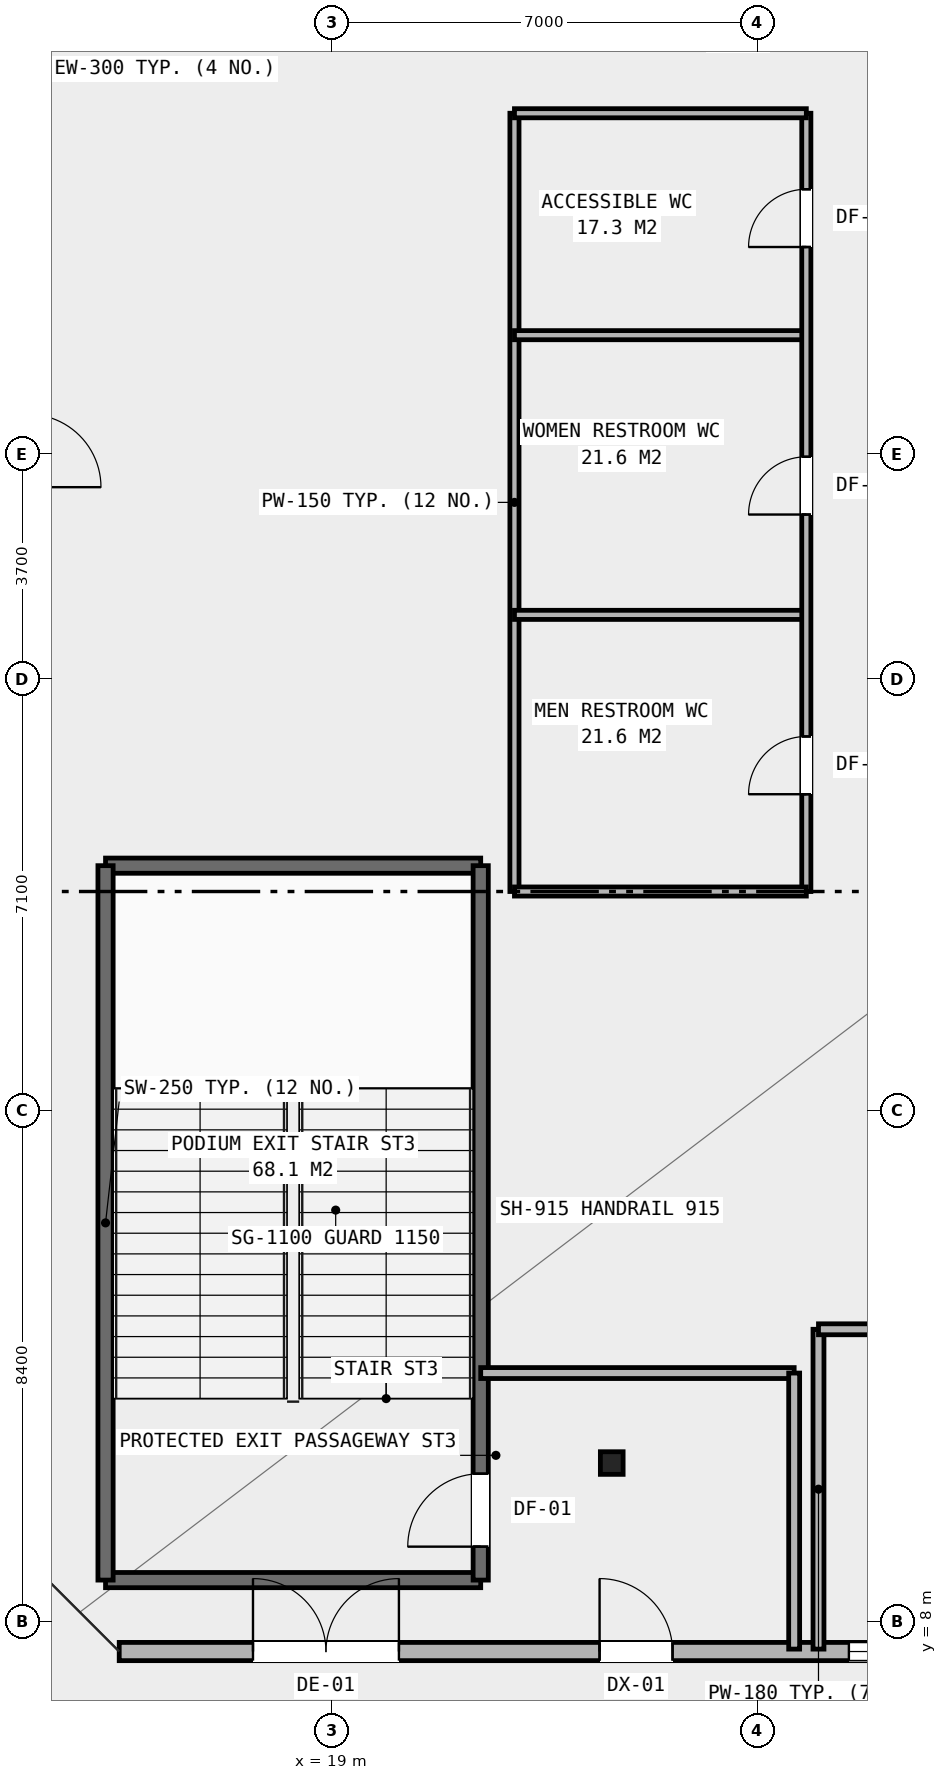
"""IFC4 building model, lengths in metres.
Left out: names, types, materials, properties, quantities, classifications, styles, units other than length and angle.
Written with IfcOpenShell. Run it as: python <this file> out.ifc"""

import sys

from ifc_helpers import new_model, si_unit, direction, frame, frame_2d, origin, origin_2d, place, context, subcontext, project, spatial, rectangle, i_section, extrude, element, fill, save


model = new_model("IFC4")
c1 = context("Model", 3, precision=1e-05, world=origin(), true_north=direction((0.0, 1.0)))
c2 = subcontext(c1, "Body", "Model", "MODEL_VIEW")
j1 = project(units=[si_unit("LENGTHUNIT", "METRE"), si_unit("PLANEANGLEUNIT", "RADIAN")], contexts=[c1])
p1 = place(None, origin())
s1 = spatial("IfcSite", under=j1, at=p1, CompositionType="ELEMENT")
p2 = place(p1, origin())
s2 = spatial("IfcBuilding", under=s1, at=p2, CompositionType="ELEMENT")
p3 = place(p2, origin())
s3 = spatial("IfcBuildingStorey", under=s2, at=p3, CompositionType="ELEMENT", Elevation=0.0)
p4 = place(p3, frame((23.6, 10.6, 0.0), z_axis=(0.0, 0.0, 1.0), x_axis=(1.0, 0.0, 0.0)))
e1 = element("IfcColumn", 1, at=p4, inside=s3, PredefinedType="COLUMN", context=c2, shape_type="SweptSolid", body=[
    extrude(i_section(OverallWidth=0.374, OverallDepth=0.372, WebThickness=0.016, FlangeThickness=0.026, at=origin_2d()), origin(), (0.0, 0.0, 1.0), 5.5),
])
p5 = place(p3, frame((15.5, 7.5, 0.0), z_axis=(0.0, 0.0, 1.0), x_axis=(1.0, 0.0, 0.0)))
e2 = element("IfcWall", 2, at=p5, inside=s3, PredefinedType="STANDARD", context=c2, shape_type="SweptSolid", body=[
    extrude(rectangle(XDim=49.0, YDim=0.3, at=frame_2d((24.5, 0.0))), origin(), (0.0, 0.0, 1.0), 5.22),
])
p6 = place(p5, frame((2.2, 0.0, 0.0)))
e3 = element("IfcOpeningElement", 3, at=p6, cuts=e2, PredefinedType="OPENING", context=c2, shape_type="SweptSolid", body=[
    extrude(rectangle(XDim=2.4, YDim=2.6, at=frame_2d((1.2, 1.3))), frame((0.0, 0.16, 0.0), z_axis=(0.0, -1.0, 0.0), x_axis=(1.0, 0.0, 0.0)), (0.0, 0.0, 1.0), 0.32),
])
p7 = place(p5, frame((22.0, 0.0, 0.0)))
e4 = element("IfcOpeningElement", 4, at=p7, cuts=e2, PredefinedType="OPENING", context=c2, shape_type="SweptSolid", body=[
    extrude(rectangle(XDim=2.4, YDim=2.6, at=frame_2d((1.2, 1.3))), frame((0.0, 0.16, 0.0), z_axis=(0.0, -1.0, 0.0), x_axis=(1.0, 0.0, 0.0)), (0.0, 0.0, 1.0), 0.32),
])
p8 = place(p5, frame((32.8, 0.0, 0.0)))
e5 = element("IfcOpeningElement", 5, at=p8, cuts=e2, PredefinedType="OPENING", context=c2, shape_type="SweptSolid", body=[
    extrude(rectangle(XDim=2.4, YDim=2.6, at=frame_2d((1.2, 1.3))), frame((0.0, 0.16, 0.0), z_axis=(0.0, -1.0, 0.0), x_axis=(1.0, 0.0, 0.0)), (0.0, 0.0, 1.0), 0.32),
])
p9 = place(p5, frame((7.9, 0.0, 0.0)))
e6 = element("IfcOpeningElement", 6, at=p9, cuts=e2, PredefinedType="OPENING", context=c2, shape_type="SweptSolid", body=[
    extrude(rectangle(XDim=1.2, YDim=2.2, at=frame_2d((0.6, 1.1))), frame((0.0, 0.16, 0.0), z_axis=(0.0, -1.0, 0.0), x_axis=(1.0, 0.0, 0.0)), (0.0, 0.0, 1.0), 0.32),
])
p10 = place(p5, frame((40.2, 0.0, 0.0)))
e7 = element("IfcOpeningElement", 7, at=p10, cuts=e2, PredefinedType="OPENING", context=c2, shape_type="SweptSolid", body=[
    extrude(rectangle(XDim=1.2, YDim=2.2, at=frame_2d((0.6, 1.1))), frame((0.0, 0.16, 0.0), z_axis=(0.0, -1.0, 0.0), x_axis=(1.0, 0.0, 0.0)), (0.0, 0.0, 1.0), 0.32),
])
p11 = place(p5, frame((12.0, 0.0, 3.2)))
e8 = element("IfcOpeningElement", 8, at=p11, cuts=e2, PredefinedType="OPENING", context=c2, shape_type="SweptSolid", body=[
    extrude(rectangle(XDim=3.0, YDim=1.2, at=frame_2d((1.5, 0.6))), frame((0.0, 0.16, 0.0), z_axis=(0.0, -1.0, 0.0), x_axis=(1.0, 0.0, 0.0)), (0.0, 0.0, 1.0), 0.32),
])
p12 = place(p5, frame((17.6, 0.0, 3.2)))
e9 = element("IfcOpeningElement", 9, at=p12, cuts=e2, PredefinedType="OPENING", context=c2, shape_type="SweptSolid", body=[
    extrude(rectangle(XDim=3.0, YDim=1.2, at=frame_2d((1.5, 0.6))), frame((0.0, 0.16, 0.0), z_axis=(0.0, -1.0, 0.0), x_axis=(1.0, 0.0, 0.0)), (0.0, 0.0, 1.0), 0.32),
])
p13 = place(p5, frame((27.6, 0.0, 3.2)))
e10 = element("IfcOpeningElement", 10, at=p13, cuts=e2, PredefinedType="OPENING", context=c2, shape_type="SweptSolid", body=[
    extrude(rectangle(XDim=3.0, YDim=1.2, at=frame_2d((1.5, 0.6))), frame((0.0, 0.16, 0.0), z_axis=(0.0, -1.0, 0.0), x_axis=(1.0, 0.0, 0.0)), (0.0, 0.0, 1.0), 0.32),
])
p14 = place(p5, frame((44.6, 0.0, 3.2)))
e11 = element("IfcOpeningElement", 11, at=p14, cuts=e2, PredefinedType="OPENING", context=c2, shape_type="SweptSolid", body=[
    extrude(rectangle(XDim=3.0, YDim=1.2, at=frame_2d((1.5, 0.6))), frame((0.0, 0.16, 0.0), z_axis=(0.0, -1.0, 0.0), x_axis=(1.0, 0.0, 0.0)), (0.0, 0.0, 1.0), 0.32),
])
for number, where, z_axis, x_axis in (
    (12, (15.275, 20.425, 0.0), (0.0, 0.0, 1.0), (1.0, 0.0, 0.0)),
    (13, (15.275, 8.675, 0.0), (0.0, 0.0, 1.0), (1.0, 0.0, 0.0)),
):
    element("IfcWall", number, at=place(p3, frame(where, z_axis=z_axis, x_axis=x_axis)), inside=s3, PredefinedType="SHEAR", context=c2, shape_type="SweptSolid", body=[
        extrude(rectangle(XDim=6.17, YDim=0.25, at=frame_2d((3.085, 0.0))), origin(), (0.0, 0.0, 1.0), 5.22),
    ])
p15 = place(p3, frame((15.275, 8.675, 0.0), z_axis=(0.0, 0.0, 1.0), x_axis=(0.0, 1.0, 0.0)))
e14 = element("IfcWall", 14, at=p15, inside=s3, PredefinedType="SHEAR", context=c2, shape_type="SweptSolid", body=[
    extrude(rectangle(XDim=11.75, YDim=0.25, at=frame_2d((5.875, 0.0))), origin(), (0.0, 0.0, 1.0), 5.22),
])
p16 = place(p3, frame((21.445, 8.675, 0.0), z_axis=(0.0, 0.0, 1.0), x_axis=(0.0, 1.0, 0.0)))
e15 = element("IfcWall", 15, at=p16, inside=s3, PredefinedType="SHEAR", context=c2, shape_type="SweptSolid", body=[
    extrude(rectangle(XDim=11.75, YDim=0.25, at=frame_2d((5.875, 0.0))), origin(), (0.0, 0.0, 1.0), 5.22),
])
p17 = place(p16, frame((0.55, 0.0, 0.0)))
e16 = element("IfcOpeningElement", 16, at=p17, cuts=e15, PredefinedType="OPENING", context=c2, shape_type="SweptSolid", body=[
    extrude(rectangle(XDim=1.2, YDim=2.15, at=frame_2d((0.6, 1.075))), frame((0.0, 0.135, 0.0), z_axis=(0.0, -1.0, 0.0), x_axis=(1.0, 0.0, 0.0)), (0.0, 0.0, 1.0), 0.27),
])
p18 = place(p3, frame((21.445, 12.08, 0.0), z_axis=(0.0, 0.0, 1.0), x_axis=(1.0, 0.0, 0.0)))
e17 = element("IfcWall", 17, at=p18, inside=s3, PredefinedType="PARTITIONING", context=c2, shape_type="SweptSolid", body=[
    extrude(rectangle(XDim=5.155, YDim=0.18, at=frame_2d((2.578, 0.0))), origin(), (0.0, 0.0, 1.0), 4.671),
])
p19 = place(p3, frame((26.6, 7.54, 0.0), z_axis=(0.0, 0.0, 1.0), x_axis=(0.0, 1.0, 0.0)))
e18 = element("IfcWall", 18, at=p19, inside=s3, PredefinedType="PARTITIONING", context=c2, shape_type="SweptSolid", body=[
    extrude(rectangle(XDim=4.54, YDim=0.18, at=frame_2d((2.27, 0.0))), origin(), (0.0, 0.0, 1.0), 5.22),
])
p20 = place(p3, frame((27.0, 7.54, 0.0), z_axis=(0.0, 0.0, 1.0), x_axis=(0.0, 1.0, 0.0)))
e19 = element("IfcWall", 19, at=p20, inside=s3, PredefinedType="PARTITIONING", context=c2, shape_type="SweptSolid", body=[
    extrude(rectangle(XDim=5.26, YDim=0.18, at=frame_2d((2.63, 0.0))), origin(), (0.0, 0.0, 1.0), 4.671),
])
p21 = place(p3, frame((22.0, 20.0, 0.0), z_axis=(0.0, 0.0, 1.0), x_axis=(0.0, 1.0, 0.0)))
e20 = element("IfcWall", 20, at=p21, inside=s3, PredefinedType="PARTITIONING", context=c2, shape_type="SweptSolid", body=[
    extrude(rectangle(XDim=12.8, YDim=0.15, at=frame_2d((6.4, 0.0))), origin(), (0.0, 0.0, 1.0), 4.431),
])
for number, where, z_axis, x_axis in (
    (21, (22.0, 24.55, 0.0), (0.0, 0.0, 1.0), (1.0, 0.0, 0.0)),
    (22, (22.0, 29.15, 0.0), (0.0, 0.0, 1.0), (1.0, 0.0, 0.0)),
):
    element("IfcWall", number, at=place(p3, frame(where, z_axis=z_axis, x_axis=x_axis)), inside=s3, PredefinedType="PARTITIONING", context=c2, shape_type="SweptSolid", body=[
        extrude(rectangle(XDim=4.8, YDim=0.15, at=frame_2d((2.4, 0.0))), origin(), (0.0, 0.0, 1.0), 5.22),
    ])
p22 = place(p3, frame((26.8, 20.0, 0.0), z_axis=(0.0, 0.0, 1.0), x_axis=(0.0, 1.0, 0.0)))
e23 = element("IfcWall", 23, at=p22, inside=s3, PredefinedType="PARTITIONING", context=c2, shape_type="SweptSolid", body=[
    extrude(rectangle(XDim=12.8, YDim=0.15, at=frame_2d((6.4, 0.0))), origin(), (0.0, 0.0, 1.0), 4.431),
])
p23 = place(p22, frame((1.6, 0.0, 0.0)))
e24 = element("IfcOpeningElement", 24, at=p23, cuts=e23, PredefinedType="OPENING", context=c2, shape_type="SweptSolid", body=[
    extrude(rectangle(XDim=0.95, YDim=2.1, at=frame_2d((0.475, 1.05))), frame((0.0, 0.085, 0.0), z_axis=(0.0, -1.0, 0.0), x_axis=(1.0, 0.0, 0.0)), (0.0, 0.0, 1.0), 0.17),
])
p24 = place(p22, frame((6.2, 0.0, 0.0)))
e25 = element("IfcOpeningElement", 25, at=p24, cuts=e23, PredefinedType="OPENING", context=c2, shape_type="SweptSolid", body=[
    extrude(rectangle(XDim=0.95, YDim=2.1, at=frame_2d((0.475, 1.05))), frame((0.0, 0.085, 0.0), z_axis=(0.0, -1.0, 0.0), x_axis=(1.0, 0.0, 0.0)), (0.0, 0.0, 1.0), 0.17),
])
p25 = place(p22, frame((10.6, 0.0, 0.0)))
e26 = element("IfcOpeningElement", 26, at=p25, cuts=e23, PredefinedType="OPENING", context=c2, shape_type="SweptSolid", body=[
    extrude(rectangle(XDim=0.95, YDim=2.1, at=frame_2d((0.475, 1.05))), frame((0.0, 0.085, 0.0), z_axis=(0.0, -1.0, 0.0), x_axis=(1.0, 0.0, 0.0)), (0.0, 0.0, 1.0), 0.17),
])
p26 = place(p3, frame((22.0, 20.0, 0.0), z_axis=(0.0, 0.0, 1.0), x_axis=(1.0, 0.0, 0.0)))
e27 = element("IfcWall", 27, at=p26, inside=s3, PredefinedType="PARTITIONING", context=c2, shape_type="SweptSolid", body=[
    extrude(rectangle(XDim=4.8, YDim=0.15, at=frame_2d((2.4, 0.0))), origin(), (0.0, 0.0, 1.0), 5.22),
])
p27 = place(p3, frame((22.0, 32.8, 0.0), z_axis=(0.0, 0.0, 1.0), x_axis=(1.0, 0.0, 0.0)))
e28 = element("IfcWall", 28, at=p27, inside=s3, PredefinedType="PARTITIONING", context=c2, shape_type="SweptSolid", body=[
    extrude(rectangle(XDim=4.8, YDim=0.15, at=frame_2d((2.4, 0.0))), origin(), (0.0, 0.0, 1.0), 4.431),
])
p28 = place(p3, frame((27.0, 12.8, 0.0), z_axis=(0.0, 0.0, 1.0), x_axis=(1.0, 0.0, 0.0)))
e29 = element("IfcWall", 29, at=p28, inside=s3, PredefinedType="PARTITIONING", context=c2, shape_type="SweptSolid", body=[
    extrude(rectangle(XDim=5.6, YDim=0.18, at=frame_2d((2.8, 0.0))), origin(), (0.0, 0.0, 1.0), 4.431),
])
p29 = place(p28, frame((2.0, 0.0, 0.0)))
e30 = element("IfcOpeningElement", 30, at=p29, cuts=e29, PredefinedType="OPENING", context=c2, shape_type="SweptSolid", body=[
    extrude(rectangle(XDim=0.95, YDim=2.1, at=frame_2d((0.475, 1.05))), frame((0.0, 0.1, 0.0), z_axis=(0.0, -1.0, 0.0), x_axis=(1.0, 0.0, 0.0)), (0.0, 0.0, 1.0), 0.2),
])
p30 = place(p6, origin())
e31 = element("IfcDoor", 31, at=p30, inside=s3, OperationType="SINGLE_SWING_LEFT", PredefinedType="DOOR", context=c2, shape_type="SweptSolid", body=[
    extrude(rectangle(XDim=2.4, YDim=2.6, at=frame_2d((1.2, 1.3))), frame((0.0, 0.025, 0.0), z_axis=(0.0, -1.0, 0.0), x_axis=(1.0, 0.0, 0.0)), (0.0, 0.0, 1.0), 0.05),
])
fill(e3, e31)
p31 = place(p9, frame((1.2, 0.0, 0.0), z_axis=(0.0, 0.0, 1.0), x_axis=(-1.0, 0.0, 0.0)))
e32 = element("IfcDoor", 32, at=p31, inside=s3, OperationType="SINGLE_SWING_LEFT", PredefinedType="DOOR", context=c2, shape_type="SweptSolid", body=[
    extrude(rectangle(XDim=1.2, YDim=2.2, at=frame_2d((0.6, 1.1))), frame((0.0, 0.025, 0.0), z_axis=(0.0, -1.0, 0.0), x_axis=(1.0, 0.0, 0.0)), (0.0, 0.0, 1.0), 0.05),
])
fill(e6, e32)
p32 = place(p11, origin())
e33 = element("IfcWindow", 33, at=p32, inside=s3, PartitioningType="SINGLE_PANEL", PredefinedType="WINDOW", context=c2, shape_type="SweptSolid", body=[
    extrude(rectangle(XDim=3.0, YDim=1.2, at=frame_2d((1.5, 0.6))), frame((0.0, 0.03, 0.0), z_axis=(0.0, -1.0, 0.0), x_axis=(1.0, 0.0, 0.0)), (0.0, 0.0, 1.0), 0.06),
])
fill(e8, e33)
p33 = place(p23, origin())
e34 = element("IfcDoor", 34, at=p33, inside=s3, OperationType="SINGLE_SWING_LEFT", PredefinedType="DOOR", context=c2, shape_type="SweptSolid", body=[
    extrude(rectangle(XDim=0.95, YDim=2.1, at=frame_2d((0.475, 1.05))), frame((0.0, 0.025, 0.0), z_axis=(0.0, -1.0, 0.0), x_axis=(1.0, 0.0, 0.0)), (0.0, 0.0, 1.0), 0.05),
])
fill(e24, e34)
p34 = place(p24, origin())
e35 = element("IfcDoor", 35, at=p34, inside=s3, OperationType="SINGLE_SWING_LEFT", PredefinedType="DOOR", context=c2, shape_type="SweptSolid", body=[
    extrude(rectangle(XDim=0.95, YDim=2.1, at=frame_2d((0.475, 1.05))), frame((0.0, 0.025, 0.0), z_axis=(0.0, -1.0, 0.0), x_axis=(1.0, 0.0, 0.0)), (0.0, 0.0, 1.0), 0.05),
])
fill(e25, e35)
p35 = place(p25, origin())
e36 = element("IfcDoor", 36, at=p35, inside=s3, OperationType="SINGLE_SWING_LEFT", PredefinedType="DOOR", context=c2, shape_type="SweptSolid", body=[
    extrude(rectangle(XDim=0.95, YDim=2.1, at=frame_2d((0.475, 1.05))), frame((0.0, 0.025, 0.0), z_axis=(0.0, -1.0, 0.0), x_axis=(1.0, 0.0, 0.0)), (0.0, 0.0, 1.0), 0.05),
])
fill(e26, e36)
p36 = place(p17, origin())
e37 = element("IfcDoor", 37, at=p36, inside=s3, OperationType="SINGLE_SWING_LEFT", PredefinedType="DOOR", context=c2, shape_type="SweptSolid", body=[
    extrude(rectangle(XDim=1.2, YDim=2.15, at=frame_2d((0.6, 1.075))), frame((0.0, 0.025, 0.0), z_axis=(0.0, -1.0, 0.0), x_axis=(1.0, 0.0, 0.0)), (0.0, 0.0, 1.0), 0.05),
])
fill(e16, e37)
save(model, sys.argv[1])
